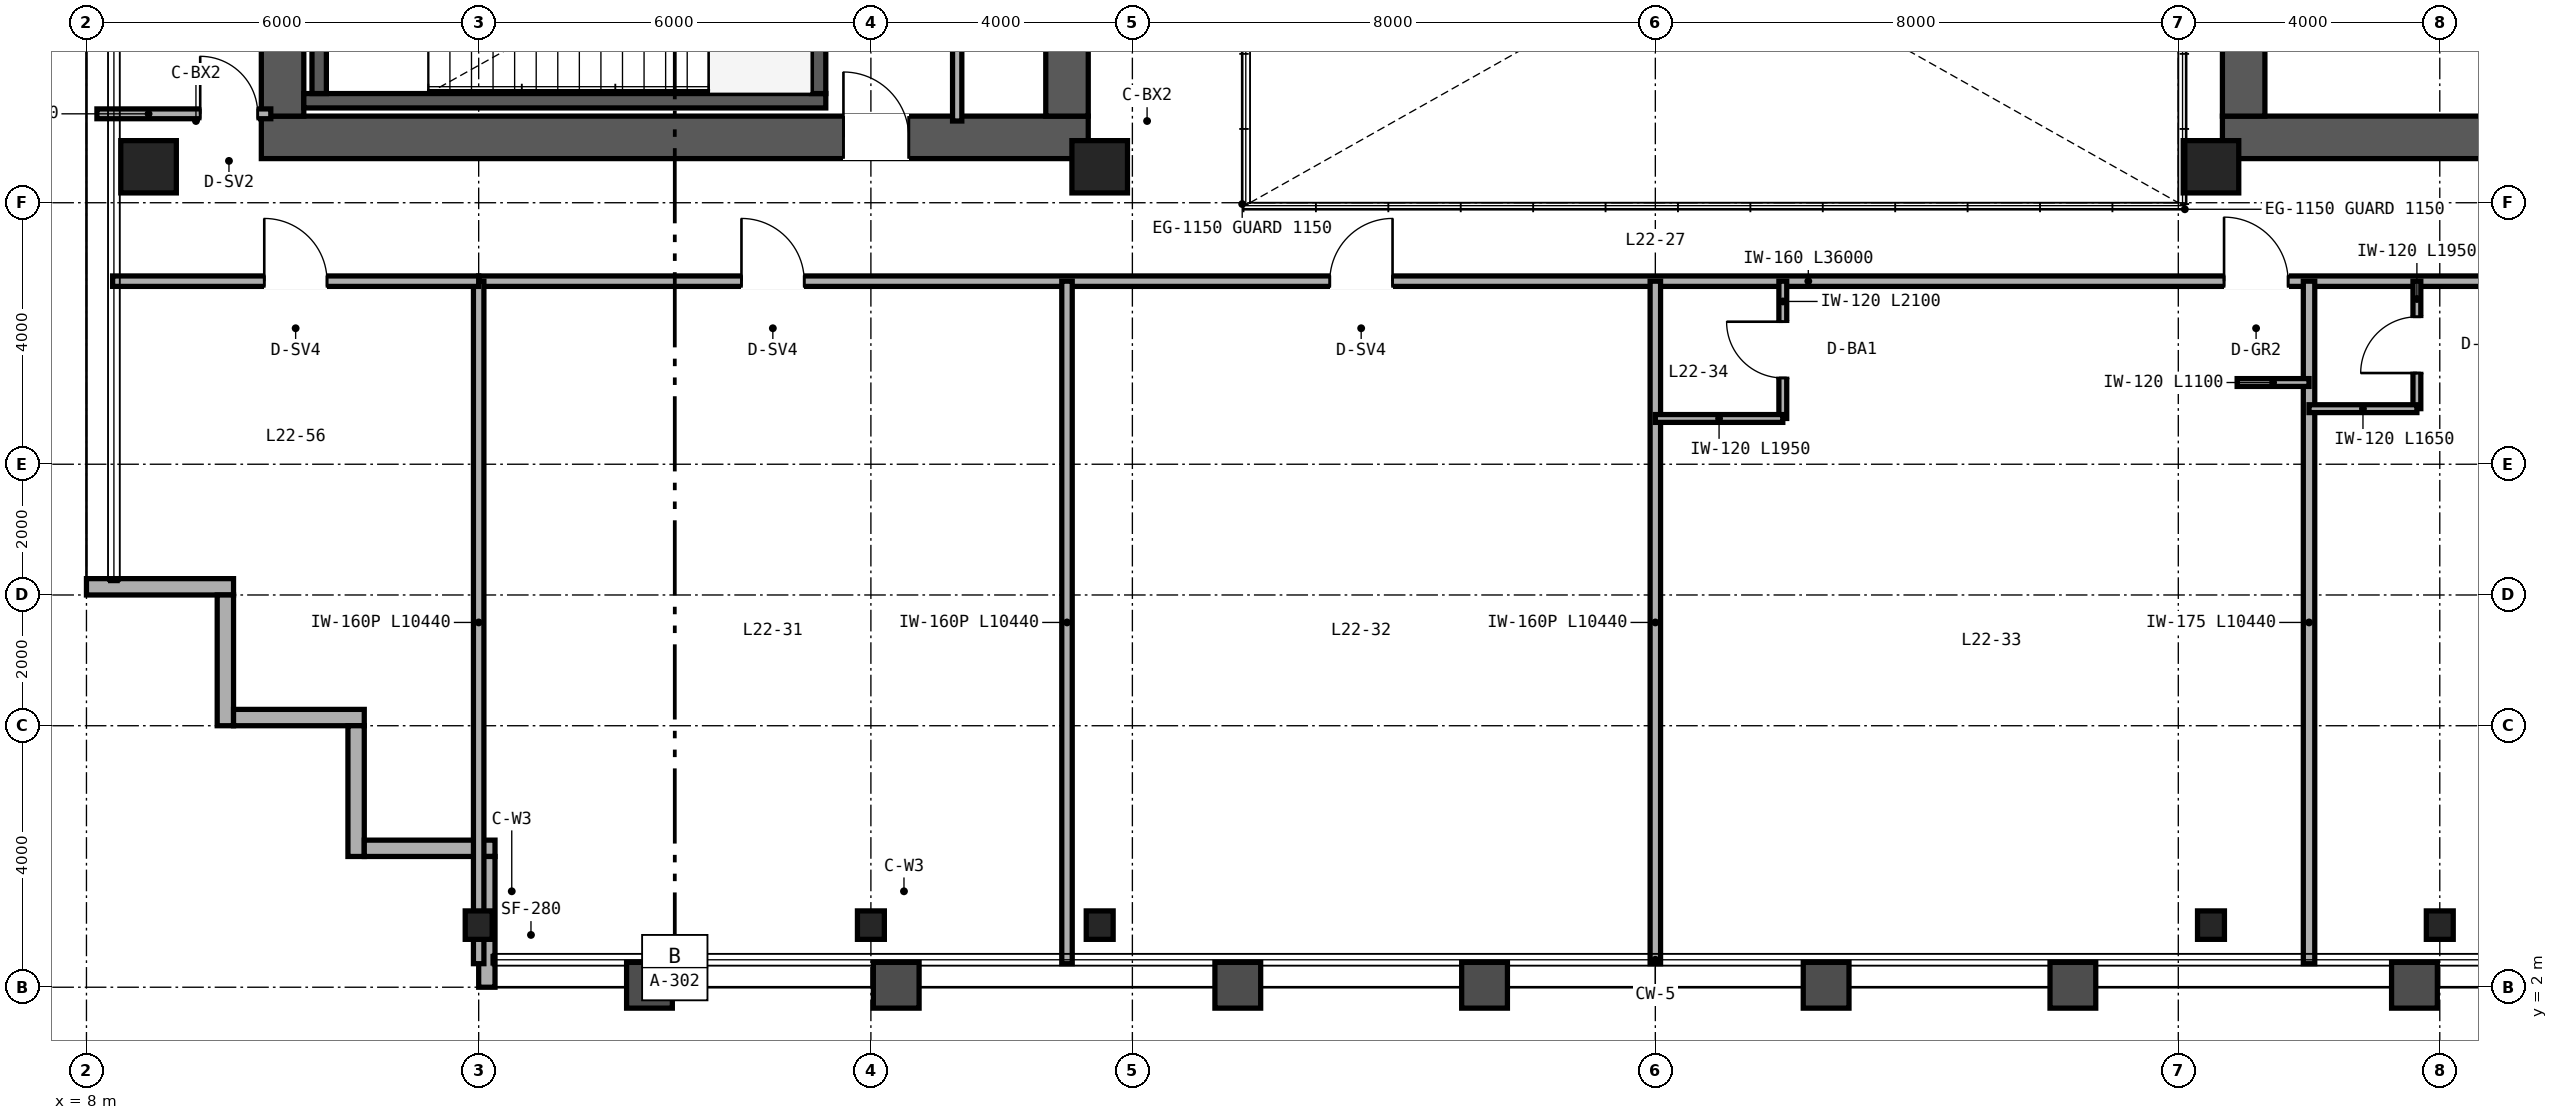
"""IFC4 building model, lengths in metres.
Left out: names, types, materials, properties, quantities, classifications, styles, units other than length and angle.
Written with IfcOpenShell. Run it as: python <this file> out.ifc"""

import sys

from ifc_helpers import new_model, si_unit, direction, frame, frame_2d, origin, origin_2d, place, context, subcontext, project, spatial, rectangle, hollow_rectangle, i_section, extrude, source, transform, mapped, element, fill, save


model = new_model("IFC4")
c1 = context("Model", 3, precision=1e-05, world=origin(), true_north=direction((0.0, 1.0)))
c2 = subcontext(c1, "Body", "Model", "MODEL_VIEW")
j1 = project(units=[si_unit("LENGTHUNIT", "METRE"), si_unit("PLANEANGLEUNIT", "RADIAN")], contexts=[c1])
p1 = place(None, origin())
s1 = spatial("IfcSite", under=j1, at=p1, CompositionType="ELEMENT")
p2 = place(p1, origin())
s2 = spatial("IfcBuilding", under=s1, at=p2, CompositionType="ELEMENT")
p3 = place(p2, frame((0.0, 0.0, 92.4)))
s3 = spatial("IfcBuildingStorey", under=s2, at=p3, CompositionType="ELEMENT", Elevation=92.4)
p4 = place(p3, frame((10.675, 15.0, 0.0), z_axis=(0.0, 0.0, 1.0), x_axis=(1.0, 0.0, 0.0)))
e1 = element("IfcWall", 1, at=p4, inside=s3, PredefinedType="SHEAR", context=c2, shape_type="SweptSolid", body=[
    extrude(rectangle(XDim=12.65, YDim=0.65, at=frame_2d((6.325, 0.0))), origin(), (0.0, 0.0, 1.0), 4.56),
])
p5 = place(p4, frame((8.905, 0.0, 0.0)))
e2 = element("IfcOpeningElement", 2, at=p5, cuts=e1, PredefinedType="OPENING", context=c2, shape_type="SweptSolid", body=[
    extrude(rectangle(XDim=1.0, YDim=2.15, at=frame_2d((0.5, 1.075))), frame((0.0, 0.335, 0.0), z_axis=(0.0, -1.0, 0.0), x_axis=(1.0, 0.0, 0.0)), (0.0, 0.0, 1.0), 0.67),
])
for number, where, z_axis, x_axis in (
    (3, (11.0, 15.325, 0.0), (0.0, 0.0, 1.0), (0.0, 1.0, 0.0)),
    (4, (23.0, 15.325, 0.0), (0.0, 0.0, 1.0), (0.0, 1.0, 0.0)),
):
    element("IfcWall", number, at=place(p3, frame(where, z_axis=z_axis, x_axis=x_axis)), inside=s3, PredefinedType="SHEAR", context=c2, shape_type="SweptSolid", body=[
        extrude(rectangle(XDim=21.35, YDim=0.65, at=frame_2d((10.675, 0.0))), origin(), (0.0, 0.0, 1.0), 4.56),
    ])
p6 = place(p3, frame((40.675, 15.0, 0.0), z_axis=(0.0, 0.0, 1.0), x_axis=(1.0, 0.0, 0.0)))
e5 = element("IfcWall", 5, at=p6, inside=s3, PredefinedType="SHEAR", context=c2, shape_type="SweptSolid", body=[
    extrude(rectangle(XDim=12.65, YDim=0.65, at=frame_2d((6.325, 0.0))), origin(), (0.0, 0.0, 1.0), 4.56),
])
p7 = place(p6, frame((4.425, 0.0, 0.0)))
e6 = element("IfcOpeningElement", 6, at=p7, cuts=e5, PredefinedType="OPENING", context=c2, shape_type="SweptSolid", body=[
    extrude(rectangle(XDim=1.0, YDim=2.15, at=frame_2d((0.5, 1.075))), frame((0.0, 0.335, 0.0), z_axis=(0.0, -1.0, 0.0), x_axis=(1.0, 0.0, 0.0)), (0.0, 0.0, 1.0), 0.67),
])
p8 = place(p3, frame((41.0, 15.325, 0.0), z_axis=(0.0, 0.0, 1.0), x_axis=(0.0, 1.0, 0.0)))
e7 = element("IfcWall", 7, at=p8, inside=s3, PredefinedType="SHEAR", context=c2, shape_type="SweptSolid", body=[
    extrude(rectangle(XDim=21.35, YDim=0.65, at=frame_2d((10.675, 0.0))), origin(), (0.0, 0.0, 1.0), 4.56),
])
p9 = place(p3, frame((11.325, 15.56, 0.0), z_axis=(0.0, 0.0, 1.0), x_axis=(1.0, 0.0, 0.0)))
e8 = element("IfcWall", 8, at=p9, inside=s3, PredefinedType="SHEAR", context=c2, shape_type="SweptSolid", body=[
    extrude(rectangle(XDim=7.985, YDim=0.22, at=frame_2d((3.993, 0.0))), origin(), (0.0, 0.0, 1.0), 4.6),
])
for number, where, z_axis, x_axis in (
    (9, (11.56, 15.67, 0.0), (0.0, 0.0, 1.0), (0.0, 1.0, 0.0)),
    (10, (19.2, 15.67, 0.0), (0.0, 0.0, 1.0), (0.0, 1.0, 0.0)),
):
    element("IfcWall", number, at=place(p3, frame(where, z_axis=z_axis, x_axis=x_axis)), inside=s3, PredefinedType="SHEAR", context=c2, shape_type="SweptSolid", body=[
        extrude(rectangle(XDim=3.28, YDim=0.22, at=frame_2d((1.64, 0.0))), origin(), (0.0, 0.0, 1.0), 4.6),
    ])
m1 = source(origin(), c2, "Body", "SweptSolid", [
    extrude(hollow_rectangle(XDim=0.85, YDim=0.8, WallThickness=0.032, at=origin_2d()), origin(), (0.0, 0.0, 1.0), 4.56),
])
for number, where, z_axis, x_axis in (
    (11, (8.95, 14.55, 0.0), (0.0, 0.0, 1.0), (1.0, 0.0, 0.0)),
    (12, (23.5, 14.55, 0.0), (0.0, 0.0, 1.0), (1.0, 0.0, 0.0)),
    (13, (40.5, 14.55, 0.0), (0.0, 0.0, 1.0), (1.0, 0.0, 0.0)),
):
    element("IfcColumn", number, at=place(p3, frame(where, z_axis=z_axis, x_axis=x_axis)), inside=s3, PredefinedType="COLUMN", context=c2, shape_type="MappedRepresentation", body=[
        mapped(m1, transform((0.0, 0.0, 0.0), scale=1.0)),
    ])
m2 = source(origin(), c2, "Body", "SweptSolid", [
    extrude(i_section(OverallWidth=0.412, OverallDepth=0.435, WebThickness=0.036, FlangeThickness=0.057, FilletRadius=0.025, at=origin_2d()), origin(), (0.0, 0.0, 1.0), 4.56),
])
for number, where, z_axis, x_axis in (
    (14, (14.0, 2.95, 0.0), (0.0, 0.0, 1.0), (1.0, 0.0, 0.0)),
    (15, (20.0, 2.95, 0.0), (0.0, 0.0, 1.0), (1.0, 0.0, 0.0)),
    (16, (23.5, 2.95, 0.0), (0.0, 0.0, 1.0), (1.0, 0.0, 0.0)),
    (17, (40.5, 2.95, 0.0), (0.0, 0.0, 1.0), (1.0, 0.0, 0.0)),
    (18, (44.0, 2.95, 0.0), (0.0, 0.0, 1.0), (1.0, 0.0, 0.0)),
):
    element("IfcColumn", number, at=place(p3, frame(where, z_axis=z_axis, x_axis=x_axis)), inside=s3, PredefinedType="COLUMN", context=c2, shape_type="MappedRepresentation", body=[
        mapped(m2, transform((0.0, 0.0, 0.0), scale=1.0)),
    ])
p10 = place(p3, frame((8.0, 8.125, 0.0), z_axis=(0.0, 0.0, 1.0), x_axis=(1.0, 0.0, 0.0)))
e19 = element("IfcWall", 19, at=p10, inside=s3, PredefinedType="SOLIDWALL", context=c2, shape_type="SweptSolid", body=[
    extrude(rectangle(XDim=2.25, YDim=0.25, at=frame_2d((1.125, 0.0))), origin(), (0.0, 0.0, 1.0), 4.56),
])
for number, where, z_axis, x_axis in (
    (20, (10.125, 8.0, 0.0), (0.0, 0.0, 1.0), (0.0, -1.0, 0.0)),
    (21, (10.25, 6.125, 0.0), (0.0, 0.0, 1.0), (1.0, 0.0, 0.0)),
    (22, (12.125, 6.0, 0.0), (0.0, 0.0, 1.0), (0.0, -1.0, 0.0)),
    (23, (12.25, 4.125, 0.0), (0.0, 0.0, 1.0), (1.0, 0.0, 0.0)),
):
    element("IfcWall", number, at=place(p3, frame(where, z_axis=z_axis, x_axis=x_axis)), inside=s3, PredefinedType="SOLIDWALL", context=c2, shape_type="SweptSolid", body=[
        extrude(rectangle(XDim=2.0, YDim=0.25, at=frame_2d((1.0, 0.0))), origin(), (0.0, 0.0, 1.0), 4.56),
    ])
p11 = place(p3, frame((14.125, 4.0, 0.0), z_axis=(0.0, 0.0, 1.0), x_axis=(0.0, -1.0, 0.0)))
e24 = element("IfcWall", 24, at=p11, inside=s3, PredefinedType="SOLIDWALL", context=c2, shape_type="SweptSolid", body=[
    extrude(rectangle(XDim=2.0, YDim=0.25, at=frame_2d((1.0, 0.0))), origin(), (0.0, 0.0, 1.0), 3.867),
])
p12 = place(p3, frame((21.32, 15.25, 0.0), z_axis=(0.0, 0.0, 1.0), x_axis=(0.0, 1.0, 0.0)))
e25 = element("IfcWall", 25, at=p12, inside=s3, PredefinedType="PARTITIONING", context=c2, shape_type="SweptSolid", body=[
    extrude(rectangle(XDim=3.59, YDim=0.142, at=frame_2d((1.795, 0.0))), origin(), (0.0, 0.0, 1.0), 4.56),
])
p13 = place(p12, frame((1.25, 0.0, 0.0)))
e26 = element("IfcOpeningElement", 26, at=p13, cuts=e25, PredefinedType="OPENING", context=c2, shape_type="SweptSolid", body=[
    extrude(rectangle(XDim=0.84, YDim=2.1, at=frame_2d((0.42, 1.05))), frame((0.0, 0.081, 0.0), z_axis=(0.0, -1.0, 0.0), x_axis=(1.0, 0.0, 0.0)), (0.0, 0.0, 1.0), 0.162),
])
p14 = place(p3, frame((14.0, 12.8, 0.0), z_axis=(0.0, 0.0, 1.0), x_axis=(1.0, 0.0, 0.0)))
e27 = element("IfcWall", 27, at=p14, inside=s3, PredefinedType="PARTITIONING", context=c2, shape_type="SweptSolid", body=[
    extrude(rectangle(XDim=36.0, YDim=0.16, at=frame_2d((18.0, 0.0))), origin(), (0.0, 0.0, 1.0), 3.781),
])
p15 = place(p14, frame((4.02, 0.0, 0.0)))
e28 = element("IfcOpeningElement", 28, at=p15, cuts=e27, PredefinedType="OPENING", context=c2, shape_type="SweptSolid", body=[
    extrude(rectangle(XDim=0.96, YDim=2.15, at=frame_2d((0.48, 1.075))), frame((0.0, 0.09, 0.0), z_axis=(0.0, -1.0, 0.0), x_axis=(1.0, 0.0, 0.0)), (0.0, 0.0, 1.0), 0.18),
])
p16 = place(p14, frame((13.02, 0.0, 0.0)))
e29 = element("IfcOpeningElement", 29, at=p16, cuts=e27, PredefinedType="OPENING", context=c2, shape_type="SweptSolid", body=[
    extrude(rectangle(XDim=0.96, YDim=2.15, at=frame_2d((0.48, 1.075))), frame((0.0, 0.09, 0.0), z_axis=(0.0, -1.0, 0.0), x_axis=(1.0, 0.0, 0.0)), (0.0, 0.0, 1.0), 0.18),
])
p17 = place(p14, frame((26.7, 0.0, 0.0)))
e30 = element("IfcOpeningElement", 30, at=p17, cuts=e27, PredefinedType="OPENING", context=c2, shape_type="SweptSolid", body=[
    extrude(rectangle(XDim=0.98, YDim=2.2, at=frame_2d((0.49, 1.1))), frame((0.0, 0.09, 0.0), z_axis=(0.0, -1.0, 0.0), x_axis=(1.0, 0.0, 0.0)), (0.0, 0.0, 1.0), 0.18),
])
p18 = place(p14, frame((34.74, 0.0, 0.0)))
e31 = element("IfcOpeningElement", 31, at=p18, cuts=e27, PredefinedType="OPENING", context=c2, shape_type="SweptSolid", body=[
    extrude(rectangle(XDim=0.94, YDim=2.15, at=frame_2d((0.47, 1.075))), frame((0.0, 0.09, 0.0), z_axis=(0.0, -1.0, 0.0), x_axis=(1.0, 0.0, 0.0)), (0.0, 0.0, 1.0), 0.18),
])
p19 = place(p3, frame((14.0, 2.36, 0.0), z_axis=(0.0, 0.0, 1.0), x_axis=(0.0, 1.0, 0.0)))
e32 = element("IfcWall", 32, at=p19, inside=s3, PredefinedType="PARTITIONING", context=c2, shape_type="SweptSolid", body=[
    extrude(rectangle(XDim=10.44, YDim=0.16, at=frame_2d((5.22, 0.0))), origin(), (0.0, 0.0, 1.0), 3.867),
])
p20 = place(p3, frame((23.0, 2.36, 0.0), z_axis=(0.0, 0.0, 1.0), x_axis=(0.0, 1.0, 0.0)))
e33 = element("IfcWall", 33, at=p20, inside=s3, PredefinedType="PARTITIONING", context=c2, shape_type="SweptSolid", body=[
    extrude(rectangle(XDim=10.44, YDim=0.16, at=frame_2d((5.22, 0.0))), origin(), (0.0, 0.0, 1.0), 4.023),
])
p21 = place(p3, frame((32.0, 2.36, 0.0), z_axis=(0.0, 0.0, 1.0), x_axis=(0.0, 1.0, 0.0)))
e34 = element("IfcWall", 34, at=p21, inside=s3, PredefinedType="PARTITIONING", context=c2, shape_type="SweptSolid", body=[
    extrude(rectangle(XDim=10.44, YDim=0.16, at=frame_2d((5.22, 0.0))), origin(), (0.0, 0.0, 1.0), 3.633),
])
p22 = place(p3, frame((42.0, 2.36, 0.0), z_axis=(0.0, 0.0, 1.0), x_axis=(0.0, 1.0, 0.0)))
e35 = element("IfcWall", 35, at=p22, inside=s3, PredefinedType="PARTITIONING", context=c2, shape_type="SweptSolid", body=[
    extrude(rectangle(XDim=10.44, YDim=0.175, at=frame_2d((5.22, 0.0))), origin(), (0.0, 0.0, 1.0), 4.023),
])
p23 = place(p3, frame((33.95, 10.7, 0.0), z_axis=(0.0, 0.0, 1.0), x_axis=(0.0, 1.0, 0.0)))
e36 = element("IfcWall", 36, at=p23, inside=s3, PredefinedType="PARTITIONING", context=c2, shape_type="SweptSolid", body=[
    extrude(rectangle(XDim=2.1, YDim=0.12, at=frame_2d((1.05, 0.0))), origin(), (0.0, 0.0, 1.0), 4.56),
])
p24 = place(p23, frame((0.62, 0.0, 0.0)))
e37 = element("IfcOpeningElement", 37, at=p24, cuts=e36, PredefinedType="OPENING", context=c2, shape_type="SweptSolid", body=[
    extrude(rectangle(XDim=0.86, YDim=2.1, at=frame_2d((0.43, 1.05))), frame((0.0, 0.07, 0.0), z_axis=(0.0, -1.0, 0.0), x_axis=(1.0, 0.0, 0.0)), (0.0, 0.0, 1.0), 0.14),
])
p25 = place(p3, frame((32.0, 10.7, 0.0), z_axis=(0.0, 0.0, 1.0), x_axis=(1.0, 0.0, 0.0)))
e38 = element("IfcWall", 38, at=p25, inside=s3, PredefinedType="PARTITIONING", context=c2, shape_type="SweptSolid", body=[
    extrude(rectangle(XDim=1.95, YDim=0.12, at=frame_2d((0.975, 0.0))), origin(), (0.0, 0.0, 1.0), 4.56),
])
p26 = place(p3, frame((40.9, 11.25, 0.0), z_axis=(0.0, 0.0, 1.0), x_axis=(1.0, 0.0, 0.0)))
e39 = element("IfcWall", 39, at=p26, inside=s3, PredefinedType="PARTITIONING", context=c2, shape_type="SweptSolid", body=[
    extrude(rectangle(XDim=1.1, YDim=0.12, at=frame_2d((0.55, 0.0))), origin(), (0.0, 0.0, 1.0), 4.56),
])
p27 = place(p3, frame((43.65, 10.85, 0.0), z_axis=(0.0, 0.0, 1.0), x_axis=(0.0, 1.0, 0.0)))
e40 = element("IfcWall", 40, at=p27, inside=s3, PredefinedType="PARTITIONING", context=c2, shape_type="SweptSolid", body=[
    extrude(rectangle(XDim=1.95, YDim=0.12, at=frame_2d((0.975, 0.0))), origin(), (0.0, 0.0, 1.0), 4.56),
])
p28 = place(p27, frame((0.545, 0.0, 0.0)))
e41 = element("IfcOpeningElement", 41, at=p28, cuts=e40, PredefinedType="OPENING", context=c2, shape_type="SweptSolid", body=[
    extrude(rectangle(XDim=0.86, YDim=2.1, at=frame_2d((0.43, 1.05))), frame((0.0, 0.07, 0.0), z_axis=(0.0, -1.0, 0.0), x_axis=(1.0, 0.0, 0.0)), (0.0, 0.0, 1.0), 0.14),
])
p29 = place(p3, frame((42.0, 10.85, 0.0), z_axis=(0.0, 0.0, 1.0), x_axis=(1.0, 0.0, 0.0)))
e42 = element("IfcWall", 42, at=p29, inside=s3, PredefinedType="PARTITIONING", context=c2, shape_type="SweptSolid", body=[
    extrude(rectangle(XDim=1.65, YDim=0.12, at=frame_2d((0.825, 0.0))), origin(), (0.0, 0.0, 1.0), 4.56),
])
p30 = place(p3, frame((8.16, 15.36, 0.0), z_axis=(0.0, 0.0, 1.0), x_axis=(1.0, 0.0, 0.0)))
e43 = element("IfcWall", 43, at=p30, inside=s3, PredefinedType="PARTITIONING", context=c2, shape_type="SweptSolid", body=[
    extrude(rectangle(XDim=2.66, YDim=0.15, at=frame_2d((1.33, 0.0))), origin(), (0.0, 0.0, 1.0), 3.781),
])
p31 = place(p30, frame((1.58, 0.0, 0.0)))
e44 = element("IfcOpeningElement", 44, at=p31, cuts=e43, PredefinedType="OPENING", context=c2, shape_type="SweptSolid", body=[
    extrude(rectangle(XDim=0.88, YDim=2.15, at=frame_2d((0.44, 1.075))), frame((0.0, 0.085, 0.0), z_axis=(0.0, -1.0, 0.0), x_axis=(1.0, 0.0, 0.0)), (0.0, 0.0, 1.0), 0.17),
])
p32 = place(p3, frame((8.4, 12.8, 0.0), z_axis=(0.0, 0.0, 1.0), x_axis=(1.0, 0.0, 0.0)))
e45 = element("IfcWall", 45, at=p32, inside=s3, PredefinedType="PARTITIONING", context=c2, shape_type="SweptSolid", body=[
    extrude(rectangle(XDim=5.6, YDim=0.16, at=frame_2d((2.8, 0.0))), origin(), (0.0, 0.0, 1.0), 4.56),
])
p33 = place(p32, frame((2.32, 0.0, 0.0)))
e46 = element("IfcOpeningElement", 46, at=p33, cuts=e45, PredefinedType="OPENING", context=c2, shape_type="SweptSolid", body=[
    extrude(rectangle(XDim=0.96, YDim=2.15, at=frame_2d((0.48, 1.075))), frame((0.0, 0.09, 0.0), z_axis=(0.0, -1.0, 0.0), x_axis=(1.0, 0.0, 0.0)), (0.0, 0.0, 1.0), 0.18),
])
m3 = source(origin(), c2, "Body", "SweptSolid", [
    extrude(rectangle(XDim=1.0, YDim=2.15, at=frame_2d((0.5, 1.075))), frame((0.0, 0.025, 0.0), z_axis=(0.0, -1.0, 0.0), x_axis=(1.0, 0.0, 0.0)), (0.0, 0.0, 1.0), 0.05),
])
p34 = place(p5, origin())
e47 = element("IfcDoor", 47, at=p34, inside=s3, OperationType="SINGLE_SWING_LEFT", PredefinedType="DOOR", context=c2, shape_type="MappedRepresentation", body=[
    mapped(m3, transform((0.0, 0.0, 0.0), scale=1.0)),
])
fill(e2, e47)
m4 = source(origin(), c2, "Body", "SweptSolid", [
    extrude(rectangle(XDim=0.86, YDim=2.1, at=frame_2d((0.43, 1.05))), frame((0.0, 0.025, 0.0), z_axis=(0.0, -1.0, 0.0), x_axis=(1.0, 0.0, 0.0)), (0.0, 0.0, 1.0), 0.05),
])
p35 = place(p24, origin())
e48 = element("IfcDoor", 48, at=p35, inside=s3, OperationType="SINGLE_SWING_RIGHT", PredefinedType="DOOR", context=c2, shape_type="MappedRepresentation", body=[
    mapped(m4, transform((0.0, 0.0, 0.0), scale=1.0)),
])
fill(e37, e48)
p36 = place(p28, origin())
e49 = element("IfcDoor", 49, at=p36, inside=s3, OperationType="SINGLE_SWING_LEFT", PredefinedType="DOOR", context=c2, shape_type="MappedRepresentation", body=[
    mapped(m4, transform((0.0, 0.0, 0.0), scale=1.0)),
])
fill(e41, e49)
m5 = source(origin(), c2, "Body", "SweptSolid", [
    extrude(rectangle(XDim=0.96, YDim=2.15, at=frame_2d((0.48, 1.075))), frame((0.0, 0.025, 0.0), z_axis=(0.0, -1.0, 0.0), x_axis=(1.0, 0.0, 0.0)), (0.0, 0.0, 1.0), 0.05),
])
p37 = place(p15, origin())
e50 = element("IfcDoor", 50, at=p37, inside=s3, OperationType="SINGLE_SWING_LEFT", PredefinedType="DOOR", context=c2, shape_type="MappedRepresentation", body=[
    mapped(m5, transform((0.0, 0.0, 0.0), scale=1.0)),
])
fill(e28, e50)
p38 = place(p16, origin())
e51 = element("IfcDoor", 51, at=p38, inside=s3, OperationType="SINGLE_SWING_RIGHT", PredefinedType="DOOR", context=c2, shape_type="MappedRepresentation", body=[
    mapped(m5, transform((0.0, 0.0, 0.0), scale=1.0)),
])
fill(e29, e51)
m6 = source(origin(), c2, "Body", "SweptSolid", [
    extrude(rectangle(XDim=0.98, YDim=2.2, at=frame_2d((0.49, 1.1))), frame((0.0, 0.025, 0.0), z_axis=(0.0, -1.0, 0.0), x_axis=(1.0, 0.0, 0.0)), (0.0, 0.0, 1.0), 0.05),
])
p39 = place(p17, origin())
e52 = element("IfcDoor", 52, at=p39, inside=s3, OperationType="SINGLE_SWING_LEFT", PredefinedType="DOOR", context=c2, shape_type="MappedRepresentation", body=[
    mapped(m6, transform((0.0, 0.0, 0.0), scale=1.0)),
])
fill(e30, e52)
m7 = source(origin(), c2, "Body", "SweptSolid", [
    extrude(rectangle(XDim=0.88, YDim=2.15, at=frame_2d((0.44, 1.075))), frame((0.0, 0.025, 0.0), z_axis=(0.0, -1.0, 0.0), x_axis=(1.0, 0.0, 0.0)), (0.0, 0.0, 1.0), 0.05),
])
p40 = place(p31, origin())
e53 = element("IfcDoor", 53, at=p40, inside=s3, OperationType="SINGLE_SWING_LEFT", PredefinedType="DOOR", context=c2, shape_type="MappedRepresentation", body=[
    mapped(m7, transform((0.0, 0.0, 0.0), scale=1.0)),
])
fill(e44, e53)
p41 = place(p33, origin())
e54 = element("IfcDoor", 54, at=p41, inside=s3, OperationType="SINGLE_SWING_LEFT", PredefinedType="DOOR", context=c2, shape_type="MappedRepresentation", body=[
    mapped(m5, transform((0.0, 0.0, 0.0), scale=1.0)),
])
fill(e46, e54)
save(model, sys.argv[1])
